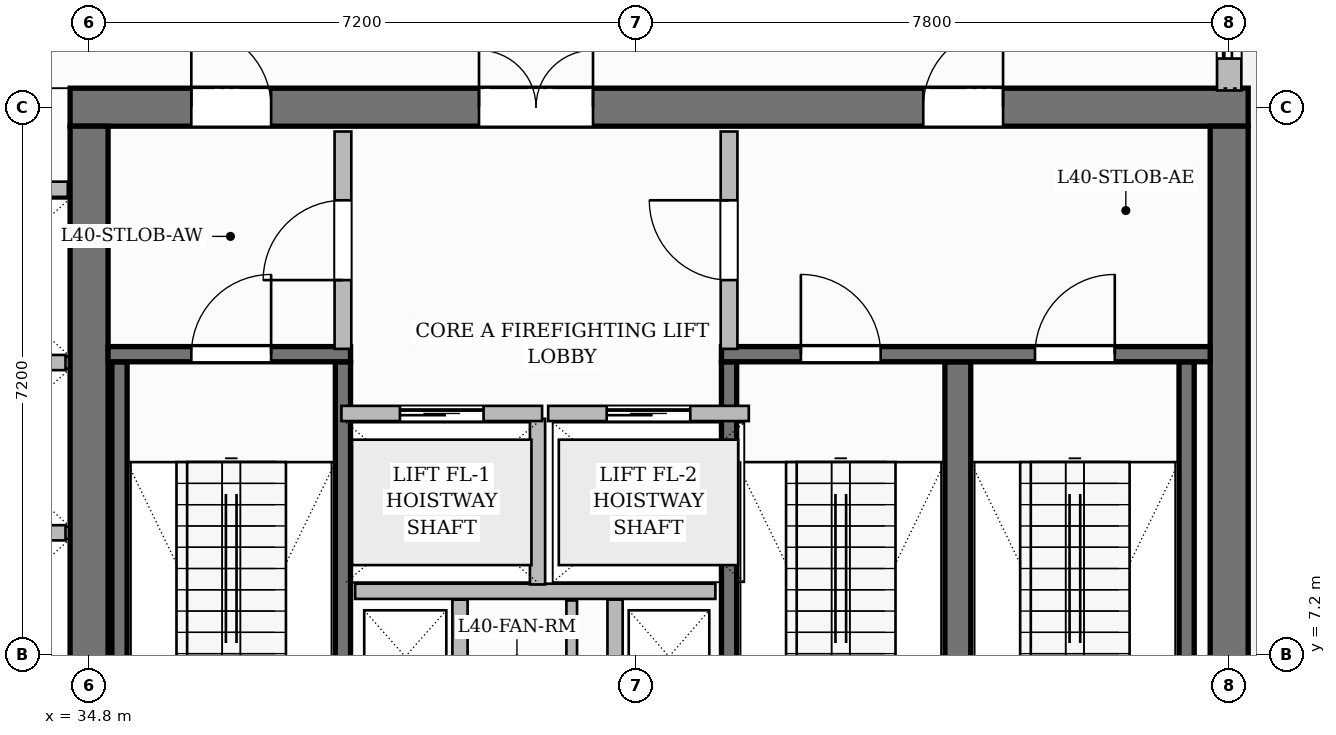
"""IFC4 building model, lengths in metres.
Left out: names, types, materials, properties, quantities, classifications, styles, units other than length and angle.
Written with IfcOpenShell. Run it as: python <this file> out.ifc"""

import sys

from ifc_helpers import new_model, si_unit, direction, frame, frame_2d, origin, place, context, subcontext, project, spatial, rectangle, extrude, source, transform, mapped, element, fill, save


model = new_model("IFC4")
c1 = context("Model", 3, precision=1e-05, world=origin(), true_north=direction((0.0, 1.0)))
c2 = subcontext(c1, "Body", "Model", "MODEL_VIEW")
j1 = project(units=[si_unit("LENGTHUNIT", "METRE"), si_unit("PLANEANGLEUNIT", "RADIAN")], contexts=[c1])
p1 = place(None, origin())
s1 = spatial("IfcSite", under=j1, at=p1, CompositionType="ELEMENT")
p2 = place(p1, origin())
s2 = spatial("IfcBuilding", under=s1, at=p2, CompositionType="ELEMENT")
p3 = place(p2, frame((0.0, 0.0, 161.85)))
s3 = spatial("IfcBuildingStorey", under=s2, at=p3, CompositionType="ELEMENT", Elevation=161.85)
p4 = place(p3, frame((34.55, 14.4, 0.0), z_axis=(0.0, 0.0, 1.0), x_axis=(1.0, 0.0, 0.0)))
e1 = element("IfcWall", 1, at=p4, inside=s3, PredefinedType="SHEAR", context=c2, shape_type="SweptSolid", body=[
    extrude(rectangle(XDim=15.5, YDim=0.5, at=frame_2d((7.75, 0.0))), origin(), (0.0, 0.0, 1.0), 3.85),
])
p5 = place(p4, frame((5.38, 0.0, 0.0)))
e2 = element("IfcOpeningElement", 2, at=p5, cuts=e1, PredefinedType="OPENING", context=c2, shape_type="SweptSolid", body=[
    extrude(rectangle(XDim=1.5, YDim=2.2, at=frame_2d((0.75, 1.1))), frame((0.0, 0.26, 0.0), z_axis=(0.0, -1.0, 0.0), x_axis=(1.0, 0.0, 0.0)), (0.0, 0.0, 1.0), 0.52),
])
p6 = place(p4, frame((1.595, 0.0, 0.0)))
e3 = element("IfcOpeningElement", 3, at=p6, cuts=e1, PredefinedType="OPENING", context=c2, shape_type="SweptSolid", body=[
    extrude(rectangle(XDim=1.05, YDim=2.15, at=frame_2d((0.525, 1.075))), frame((0.0, 0.26, 0.0), z_axis=(0.0, -1.0, 0.0), x_axis=(1.0, 0.0, 0.0)), (0.0, 0.0, 1.0), 0.52),
])
p7 = place(p4, frame((11.225, 0.0, 0.0)))
e4 = element("IfcOpeningElement", 4, at=p7, cuts=e1, PredefinedType="OPENING", context=c2, shape_type="SweptSolid", body=[
    extrude(rectangle(XDim=1.05, YDim=2.15, at=frame_2d((0.525, 1.075))), frame((0.0, 0.26, 0.0), z_axis=(0.0, -1.0, 0.0), x_axis=(1.0, 0.0, 0.0)), (0.0, 0.0, 1.0), 0.52),
])
for number, where, z_axis, x_axis in (
    (5, (34.8, 3.85, 0.0), (0.0, 0.0, 1.0), (0.0, 1.0, 0.0)),
    (6, (49.8, 3.85, 0.0), (0.0, 0.0, 1.0), (0.0, 1.0, 0.0)),
):
    element("IfcWall", number, at=place(p3, frame(where, z_axis=z_axis, x_axis=x_axis)), inside=s3, PredefinedType="SHEAR", context=c2, shape_type="SweptSolid", body=[
        extrude(rectangle(XDim=10.3, YDim=0.5, at=frame_2d((5.15, 0.0))), origin(), (0.0, 0.0, 1.0), 3.85),
    ])
for number, where, z_axis, x_axis in (
    (7, (35.2, 4.1, 0.0), (0.0, 0.0, 1.0), (0.0, 1.0, 0.0)),
    (8, (38.14, 4.1, 0.0), (0.0, 0.0, 1.0), (0.0, 1.0, 0.0)),
):
    element("IfcWall", number, at=place(p3, frame(where, z_axis=z_axis, x_axis=x_axis)), inside=s3, PredefinedType="SHEAR", context=c2, shape_type="SweptSolid", body=[
        extrude(rectangle(XDim=6.95, YDim=0.2, at=frame_2d((3.475, 0.0))), origin(), (0.0, 0.0, 1.0), 3.85),
    ])
p8 = place(p3, frame((35.05, 11.15, 0.0), z_axis=(0.0, 0.0, 1.0), x_axis=(1.0, 0.0, 0.0)))
e9 = element("IfcWall", 9, at=p8, inside=s3, PredefinedType="SHEAR", context=c2, shape_type="SweptSolid", body=[
    extrude(rectangle(XDim=3.19, YDim=0.2, at=frame_2d((1.595, 0.0))), origin(), (0.0, 0.0, 1.0), 3.85),
])
p9 = place(p8, frame((1.095, 0.0, 0.0)))
e10 = element("IfcOpeningElement", 10, at=p9, cuts=e9, PredefinedType="OPENING", context=c2, shape_type="SweptSolid", body=[
    extrude(rectangle(XDim=1.05, YDim=2.2, at=frame_2d((0.525, 1.1))), frame((0.0, 0.11, 0.0), z_axis=(0.0, -1.0, 0.0), x_axis=(1.0, 0.0, 0.0)), (0.0, 0.0, 1.0), 0.22),
])
p10 = place(p3, frame((43.22, 4.1, 0.0), z_axis=(0.0, 0.0, 1.0), x_axis=(0.0, 1.0, 0.0)))
e11 = element("IfcWall", 11, at=p10, inside=s3, PredefinedType="SHEAR", context=c2, shape_type="SweptSolid", body=[
    extrude(rectangle(XDim=6.95, YDim=0.2, at=frame_2d((3.475, 0.0))), origin(), (0.0, 0.0, 1.0), 3.85),
])
p11 = place(p3, frame((46.23, 4.1, 0.0), z_axis=(0.0, 0.0, 1.0), x_axis=(0.0, 1.0, 0.0)))
e12 = element("IfcWall", 12, at=p11, inside=s3, PredefinedType="SHEAR", context=c2, shape_type="SweptSolid", body=[
    extrude(rectangle(XDim=6.95, YDim=0.34, at=frame_2d((3.475, 0.0))), origin(), (0.0, 0.0, 1.0), 3.85),
])
p12 = place(p3, frame((49.24, 4.1, 0.0), z_axis=(0.0, 0.0, 1.0), x_axis=(0.0, 1.0, 0.0)))
e13 = element("IfcWall", 13, at=p12, inside=s3, PredefinedType="SHEAR", context=c2, shape_type="SweptSolid", body=[
    extrude(rectangle(XDim=6.95, YDim=0.2, at=frame_2d((3.475, 0.0))), origin(), (0.0, 0.0, 1.0), 3.85),
])
p13 = place(p3, frame((43.12, 11.15, 0.0), z_axis=(0.0, 0.0, 1.0), x_axis=(1.0, 0.0, 0.0)))
e14 = element("IfcWall", 14, at=p13, inside=s3, PredefinedType="SHEAR", context=c2, shape_type="SweptSolid", body=[
    extrude(rectangle(XDim=6.43, YDim=0.2, at=frame_2d((3.215, 0.0))), origin(), (0.0, 0.0, 1.0), 3.85),
])
p14 = place(p13, frame((1.045, 0.0, 0.0)))
e15 = element("IfcOpeningElement", 15, at=p14, cuts=e14, PredefinedType="OPENING", context=c2, shape_type="SweptSolid", body=[
    extrude(rectangle(XDim=1.05, YDim=2.2, at=frame_2d((0.525, 1.1))), frame((0.0, 0.11, 0.0), z_axis=(0.0, -1.0, 0.0), x_axis=(1.0, 0.0, 0.0)), (0.0, 0.0, 1.0), 0.22),
])
p15 = place(p13, frame((4.125, 0.0, 0.0)))
e16 = element("IfcOpeningElement", 16, at=p15, cuts=e14, PredefinedType="OPENING", context=c2, shape_type="SweptSolid", body=[
    extrude(rectangle(XDim=1.05, YDim=2.2, at=frame_2d((0.525, 1.1))), frame((0.0, 0.11, 0.0), z_axis=(0.0, -1.0, 0.0), x_axis=(1.0, 0.0, 0.0)), (0.0, 0.0, 1.0), 0.22),
])
p16 = place(p3, frame((38.3, 8.03, 0.0), z_axis=(0.0, 0.0, 1.0), x_axis=(1.0, 0.0, 0.0)))
e17 = element("IfcWall", 17, at=p16, inside=s3, PredefinedType="PARTITIONING", context=c2, shape_type="SweptSolid", body=[
    extrude(rectangle(XDim=4.74, YDim=0.2, at=frame_2d((2.37, 0.0))), origin(), (0.0, 0.0, 1.0), 3.6),
])
p17 = place(p3, frame((40.7, 8.12, 0.0), z_axis=(0.0, 0.0, 1.0), x_axis=(0.0, 1.0, 0.0)))
e18 = element("IfcWall", 18, at=p17, inside=s3, PredefinedType="PARTITIONING", context=c2, shape_type="SweptSolid", body=[
    extrude(rectangle(XDim=2.18, YDim=0.2, at=frame_2d((1.09, 0.0))), origin(), (0.0, 0.0, 1.0), 3.6),
])
p18 = place(p3, frame((38.14, 11.22, 0.0), z_axis=(0.0, 0.0, 1.0), x_axis=(0.0, 1.0, 0.0)))
e19 = element("IfcWall", 19, at=p18, inside=s3, PredefinedType="PARTITIONING", context=c2, shape_type="SweptSolid", body=[
    extrude(rectangle(XDim=2.86, YDim=0.22, at=frame_2d((1.43, 0.0))), origin(), (0.0, 0.0, 1.0), 3.6),
])
p19 = place(p18, frame((0.905, 0.0, 0.0)))
e20 = element("IfcOpeningElement", 20, at=p19, cuts=e19, PredefinedType="OPENING", context=c2, shape_type="SweptSolid", body=[
    extrude(rectangle(XDim=1.05, YDim=2.15, at=frame_2d((0.525, 1.075))), frame((0.0, 0.12, 0.0), z_axis=(0.0, -1.0, 0.0), x_axis=(1.0, 0.0, 0.0)), (0.0, 0.0, 1.0), 0.24),
])
p20 = place(p3, frame((43.22, 11.22, 0.0), z_axis=(0.0, 0.0, 1.0), x_axis=(0.0, 1.0, 0.0)))
e21 = element("IfcWall", 21, at=p20, inside=s3, PredefinedType="PARTITIONING", context=c2, shape_type="SweptSolid", body=[
    extrude(rectangle(XDim=2.86, YDim=0.22, at=frame_2d((1.43, 0.0))), origin(), (0.0, 0.0, 1.0), 3.6),
])
p21 = place(p20, frame((0.905, 0.0, 0.0)))
e22 = element("IfcOpeningElement", 22, at=p21, cuts=e21, PredefinedType="OPENING", context=c2, shape_type="SweptSolid", body=[
    extrude(rectangle(XDim=1.05, YDim=2.15, at=frame_2d((0.525, 1.075))), frame((0.0, 0.12, 0.0), z_axis=(0.0, -1.0, 0.0), x_axis=(1.0, 0.0, 0.0)), (0.0, 0.0, 1.0), 0.24),
])
for number, where, z_axis, x_axis in (
    (23, (39.68, 6.13, 0.0), (0.0, 0.0, 1.0), (0.0, 1.0, 0.0)),
    (24, (41.72, 6.13, 0.0), (0.0, 0.0, 1.0), (0.0, 1.0, 0.0)),
):
    element("IfcWall", number, at=place(p3, frame(where, z_axis=z_axis, x_axis=x_axis)), inside=s3, PredefinedType="PARTITIONING", context=c2, shape_type="SweptSolid", body=[
        extrude(rectangle(XDim=1.79, YDim=0.2, at=frame_2d((0.895, 0.0))), origin(), (0.0, 0.0, 1.0), 3.6),
    ])
p22 = place(p3, frame((41.15, 3.87, 0.0), z_axis=(0.0, 0.0, 1.0), x_axis=(0.0, 1.0, 0.0)))
e25 = element("IfcWall", 25, at=p22, inside=s3, PredefinedType="PARTITIONING", context=c2, shape_type="SweptSolid", body=[
    extrude(rectangle(XDim=4.04, YDim=0.14, at=frame_2d((2.02, 0.0))), origin(), (0.0, 0.0, 1.0), 3.6),
])
p23 = place(p3, frame((32.16, 13.32, 0.0), z_axis=(0.0, 0.0, 1.0), x_axis=(1.0, 0.0, 0.0)))
e26 = element("IfcWall", 26, at=p23, inside=s3, PredefinedType="PARTITIONING", context=c2, shape_type="SweptSolid", body=[
    extrude(rectangle(XDim=2.36, YDim=0.2, at=frame_2d((1.18, 0.0))), origin(), (0.0, 0.0, 1.0), 3.6),
])
for number, where, z_axis, x_axis in (
    (27, (32.26, 8.8, 0.0), (0.0, 0.0, 1.0), (1.0, 0.0, 0.0)),
    (28, (32.26, 11.04, 0.0), (0.0, 0.0, 1.0), (1.0, 0.0, 0.0)),
):
    element("IfcWall", number, at=place(p3, frame(where, z_axis=z_axis, x_axis=x_axis)), inside=s3, PredefinedType="PARTITIONING", context=c2, shape_type="SweptSolid", body=[
        extrude(rectangle(XDim=2.23, YDim=0.2, at=frame_2d((1.115, 0.0))), origin(), (0.0, 0.0, 1.0), 3.6),
    ])
p24 = place(p3, frame((38.12, 10.37, 0.0), z_axis=(0.0, 0.0, 1.0), x_axis=(1.0, 0.0, 0.0)))
e29 = element("IfcWall", 29, at=p24, inside=s3, PredefinedType="PARTITIONING", context=c2, shape_type="SweptSolid", body=[
    extrude(rectangle(XDim=2.64, YDim=0.2, at=frame_2d((1.32, 0.0))), origin(), (0.0, 0.0, 1.0), 3.6),
])
p25 = place(p24, frame((0.77, 0.0, 0.0)))
e30 = element("IfcOpeningElement", 30, at=p25, cuts=e29, PredefinedType="OPENING", context=c2, shape_type="SweptSolid", body=[
    extrude(rectangle(XDim=1.1, YDim=2.2, at=frame_2d((0.55, 1.1))), frame((0.0, 0.11, 0.0), z_axis=(0.0, -1.0, 0.0), x_axis=(1.0, 0.0, 0.0)), (0.0, 0.0, 1.0), 0.22),
])
p26 = place(p3, frame((40.84, 10.37, 0.0), z_axis=(0.0, 0.0, 1.0), x_axis=(1.0, 0.0, 0.0)))
e31 = element("IfcWall", 31, at=p26, inside=s3, PredefinedType="PARTITIONING", context=c2, shape_type="SweptSolid", body=[
    extrude(rectangle(XDim=2.64, YDim=0.2, at=frame_2d((1.32, 0.0))), origin(), (0.0, 0.0, 1.0), 3.6),
])
p27 = place(p26, frame((0.77, 0.0, 0.0)))
e32 = element("IfcOpeningElement", 32, at=p27, cuts=e31, PredefinedType="OPENING", context=c2, shape_type="SweptSolid", body=[
    extrude(rectangle(XDim=1.1, YDim=2.2, at=frame_2d((0.55, 1.1))), frame((0.0, 0.11, 0.0), z_axis=(0.0, -1.0, 0.0), x_axis=(1.0, 0.0, 0.0)), (0.0, 0.0, 1.0), 0.22),
])
p28 = place(p3, frame((49.8, 14.62, 0.0), z_axis=(0.0, 0.0, 1.0), x_axis=(0.0, 1.0, 0.0)))
e33 = element("IfcWall", 33, at=p28, inside=s3, PredefinedType="SOLIDWALL", context=c2, shape_type="SweptSolid", body=[
    extrude(rectangle(XDim=6.93, YDim=0.32, at=frame_2d((3.465, 0.0))), origin(), (0.0, 0.0, 1.0), 3.085),
])
p29 = place(p28, frame((0.42, 0.0, 0.0)))
e34 = element("IfcOpeningElement", 34, at=p29, cuts=e33, PredefinedType="OPENING", context=c2, shape_type="SweptSolid", body=[
    extrude(rectangle(XDim=1.2, YDim=2.2, at=frame_2d((0.6, 1.1))), frame((0.0, 0.17, 0.0), z_axis=(0.0, -1.0, 0.0), x_axis=(1.0, 0.0, 0.0)), (0.0, 0.0, 1.0), 0.34),
])
p30 = place(p28, frame((3.659, 0.0, 0.8)))
e35 = element("IfcOpeningElement", 35, at=p30, cuts=e33, PredefinedType="OPENING", context=c2, shape_type="SweptSolid", body=[
    extrude(rectangle(XDim=1.8, YDim=1.85, at=frame_2d((0.9, 0.925))), frame((0.0, 0.17, 0.0), z_axis=(0.0, -1.0, 0.0), x_axis=(1.0, 0.0, 0.0)), (0.0, 0.0, 1.0), 0.34),
])
m1 = source(origin(), c2, "Body", "SweptSolid", [
    extrude(rectangle(XDim=1.05, YDim=2.2, at=frame_2d((0.525, 1.1))), frame((0.0, 0.025, 0.0), z_axis=(0.0, -1.0, 0.0), x_axis=(1.0, 0.0, 0.0)), (0.0, 0.0, 1.0), 0.05),
])
p31 = place(p9, origin())
e36 = element("IfcDoor", 36, at=p31, inside=s3, OperationType="SINGLE_SWING_RIGHT", PredefinedType="DOOR", context=c2, shape_type="MappedRepresentation", body=[
    mapped(m1, transform((0.0, 0.0, 0.0), scale=1.0)),
])
fill(e10, e36)
p32 = place(p14, origin())
e37 = element("IfcDoor", 37, at=p32, inside=s3, OperationType="SINGLE_SWING_LEFT", PredefinedType="DOOR", context=c2, shape_type="MappedRepresentation", body=[
    mapped(m1, transform((0.0, 0.0, 0.0), scale=1.0)),
])
fill(e15, e37)
p33 = place(p15, origin())
e38 = element("IfcDoor", 38, at=p33, inside=s3, OperationType="SINGLE_SWING_RIGHT", PredefinedType="DOOR", context=c2, shape_type="MappedRepresentation", body=[
    mapped(m1, transform((0.0, 0.0, 0.0), scale=1.0)),
])
fill(e16, e38)
m2 = source(origin(), c2, "Body", "SweptSolid", [
    extrude(rectangle(XDim=1.05, YDim=2.15, at=frame_2d((0.525, 1.075))), frame((0.0, 0.025, 0.0), z_axis=(0.0, -1.0, 0.0), x_axis=(1.0, 0.0, 0.0)), (0.0, 0.0, 1.0), 0.05),
])
p34 = place(p19, origin())
e39 = element("IfcDoor", 39, at=p34, inside=s3, OperationType="SINGLE_SWING_LEFT", PredefinedType="DOOR", context=c2, shape_type="MappedRepresentation", body=[
    mapped(m2, transform((0.0, 0.0, 0.0), scale=1.0)),
])
fill(e20, e39)
p35 = place(p21, origin())
e40 = element("IfcDoor", 40, at=p35, inside=s3, OperationType="SINGLE_SWING_RIGHT", PredefinedType="DOOR", context=c2, shape_type="MappedRepresentation", body=[
    mapped(m2, transform((0.0, 0.0, 0.0), scale=1.0)),
])
fill(e22, e40)
m3 = source(origin(), c2, "Body", "SweptSolid", [
    extrude(rectangle(XDim=1.5, YDim=2.2, at=frame_2d((0.75, 1.1))), frame((0.0, 0.025, 0.0), z_axis=(0.0, -1.0, 0.0), x_axis=(1.0, 0.0, 0.0)), (0.0, 0.0, 1.0), 0.05),
])
p36 = place(p5, origin())
e41 = element("IfcDoor", 41, at=p36, inside=s3, OperationType="DOUBLE_DOOR_SINGLE_SWING", PredefinedType="DOOR", context=c2, shape_type="MappedRepresentation", body=[
    mapped(m3, transform((0.0, 0.0, 0.0), scale=1.0)),
])
fill(e2, e41)
p37 = place(p6, origin())
e42 = element("IfcDoor", 42, at=p37, inside=s3, OperationType="SINGLE_SWING_LEFT", PredefinedType="DOOR", context=c2, shape_type="MappedRepresentation", body=[
    mapped(m2, transform((0.0, 0.0, 0.0), scale=1.0)),
])
fill(e3, e42)
p38 = place(p7, origin())
e43 = element("IfcDoor", 43, at=p38, inside=s3, OperationType="SINGLE_SWING_RIGHT", PredefinedType="DOOR", context=c2, shape_type="MappedRepresentation", body=[
    mapped(m2, transform((0.0, 0.0, 0.0), scale=1.0)),
])
fill(e4, e43)
m4 = source(origin(), c2, "Body", "SweptSolid", [
    extrude(rectangle(XDim=1.1, YDim=2.2, at=frame_2d((0.55, 1.1))), frame((0.0, 0.025, 0.0), z_axis=(0.0, -1.0, 0.0), x_axis=(1.0, 0.0, 0.0)), (0.0, 0.0, 1.0), 0.05),
])
p39 = place(p25, origin())
e44 = element("IfcDoor", 44, at=p39, inside=s3, OperationType="SLIDING_TO_LEFT", PredefinedType="DOOR", context=c2, shape_type="MappedRepresentation", body=[
    mapped(m4, transform((0.0, 0.0, 0.0), scale=1.0)),
])
fill(e30, e44)
p40 = place(p27, origin())
e45 = element("IfcDoor", 45, at=p40, inside=s3, OperationType="SLIDING_TO_LEFT", PredefinedType="DOOR", context=c2, shape_type="MappedRepresentation", body=[
    mapped(m4, transform((0.0, 0.0, 0.0), scale=1.0)),
])
fill(e32, e45)
m5 = source(origin(), c2, "Body", "SweptSolid", [
    extrude(rectangle(XDim=1.2, YDim=2.2, at=frame_2d((0.6, 1.1))), frame((0.0, 0.025, 0.0), z_axis=(0.0, -1.0, 0.0), x_axis=(1.0, 0.0, 0.0)), (0.0, 0.0, 1.0), 0.05),
])
p41 = place(p29, origin())
e46 = element("IfcDoor", 46, at=p41, inside=s3, OperationType="SLIDING_TO_LEFT", PredefinedType="DOOR", context=c2, shape_type="MappedRepresentation", body=[
    mapped(m5, transform((0.0, 0.0, 0.0), scale=1.0)),
])
fill(e34, e46)
save(model, sys.argv[1])
